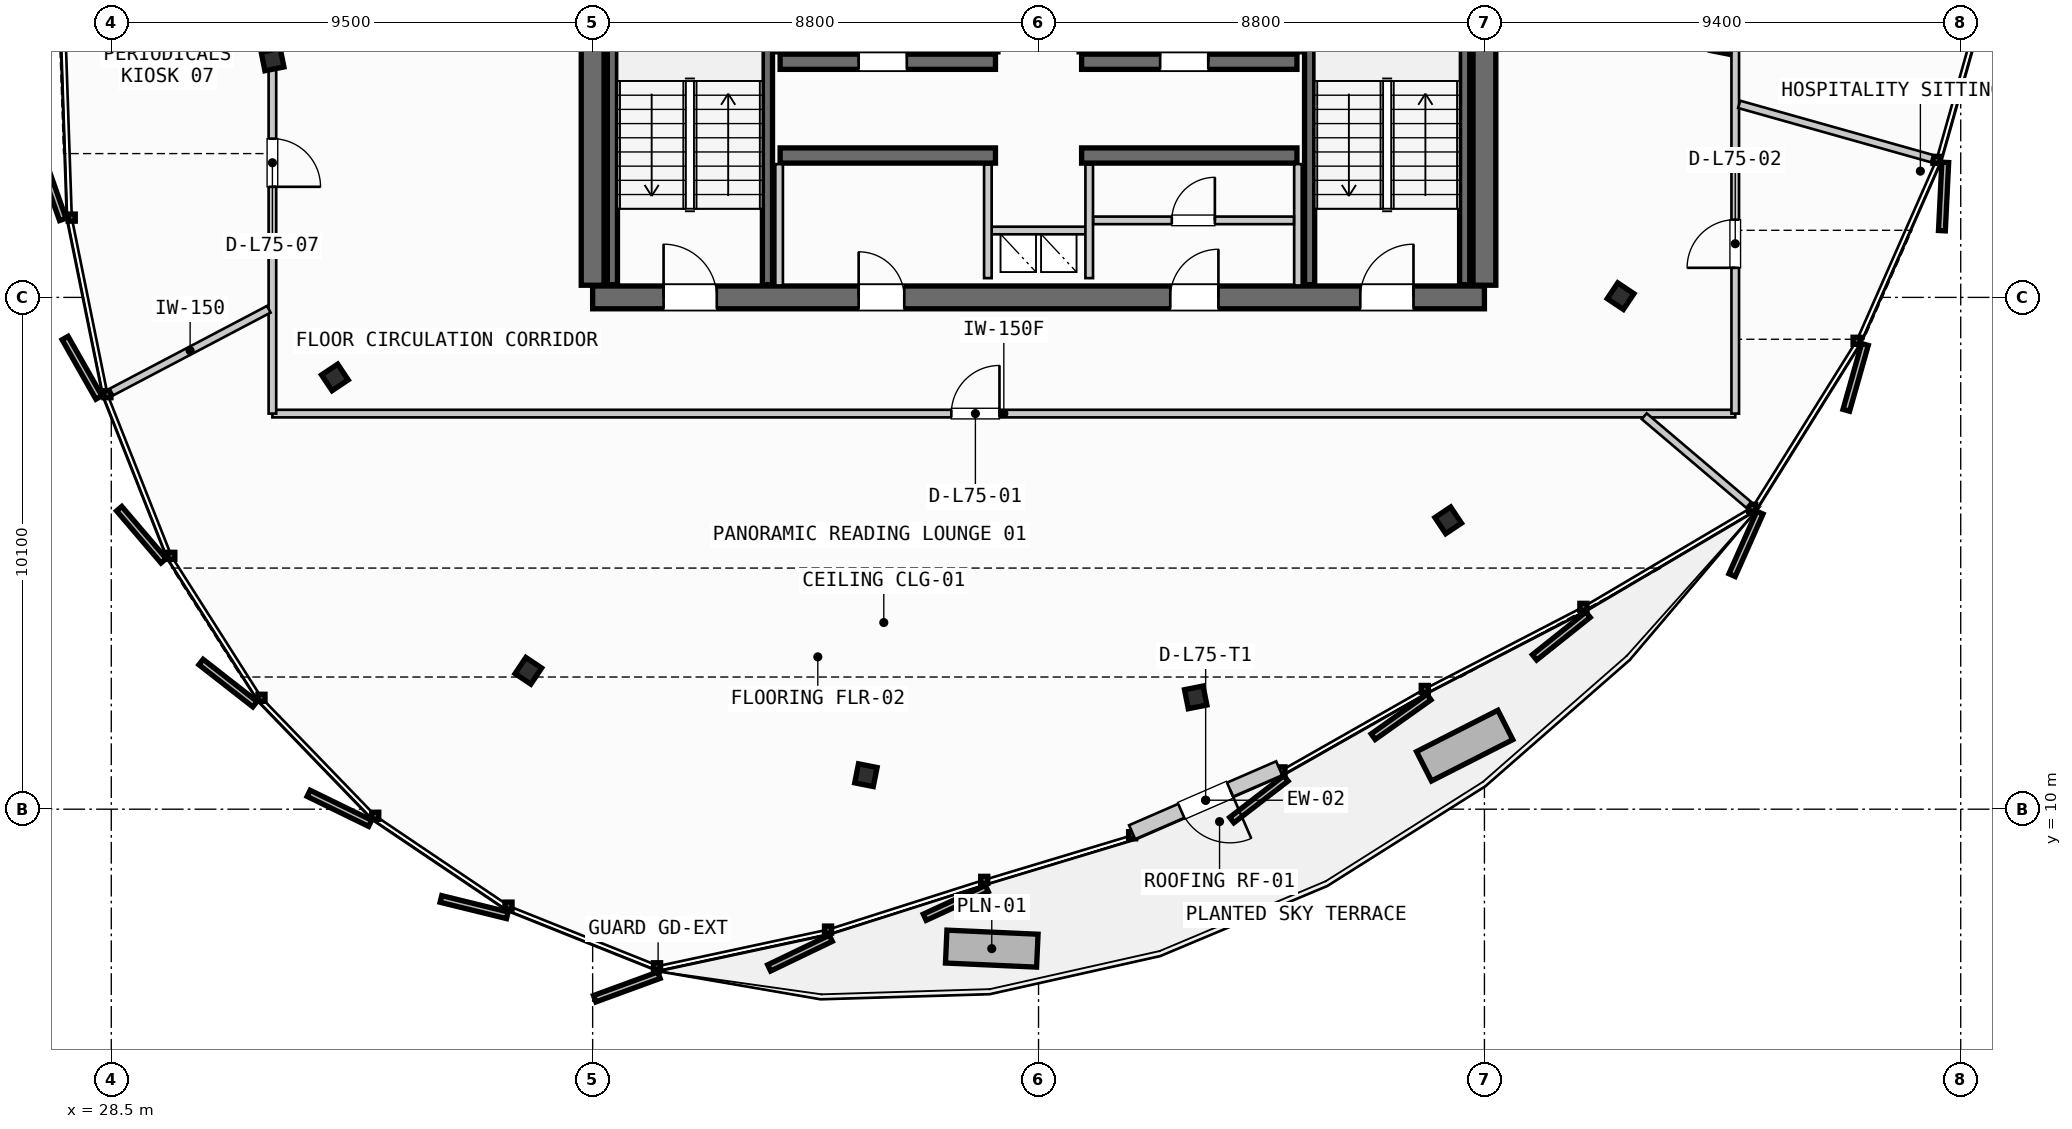
"""IFC4 building model, lengths in metres.
Left out: names, types, materials, properties, quantities, classifications, styles, units other than length and angle.
Written with IfcOpenShell. Run it as: python <this file> out.ifc"""

import sys

from ifc_helpers import new_model, si_unit, direction, frame, frame_2d, origin, origin_2d, place, context, subcontext, project, spatial, rectangle, i_section, extrude, source, transform, mapped, element, fill, save


model = new_model("IFC4")
c1 = context("Model", 3, precision=1e-05, world=origin(), true_north=direction((0.0, 1.0)))
c2 = subcontext(c1, "Body", "Model", "MODEL_VIEW")
j1 = project(units=[si_unit("LENGTHUNIT", "METRE"), si_unit("PLANEANGLEUNIT", "RADIAN")], contexts=[c1])
p1 = place(None, origin())
s1 = spatial("IfcSite", under=j1, at=p1, CompositionType="ELEMENT")
p2 = place(p1, origin())
s2 = spatial("IfcBuilding", under=s1, at=p2, CompositionType="ELEMENT")
p3 = place(p2, frame((0.0, 0.0, 283.6)))
s3 = spatial("IfcBuildingStorey", under=s2, at=p3, CompositionType="ELEMENT", Elevation=283.6)
p4 = place(p3, frame((38.0, 20.1, 0.0), z_axis=(0.0, 0.0, 1.0), x_axis=(1.0, 0.0, 0.0)))
e1 = element("IfcWall", 1, at=p4, inside=s3, PredefinedType="SHEAR", context=c2, shape_type="SweptSolid", body=[
    extrude(rectangle(XDim=17.6, YDim=0.45, at=frame_2d((8.8, 0.0))), origin(), (0.0, 0.0, 1.0), 3.21),
])
p5 = place(p4, frame((1.4, 0.0, 0.0)))
e2 = element("IfcOpeningElement", 2, at=p5, cuts=e1, PredefinedType="OPENING", context=c2, shape_type="SweptSolid", body=[
    extrude(rectangle(XDim=1.05, YDim=2.15, at=frame_2d((0.525, 1.075))), frame((0.0, 0.235, 0.0), z_axis=(0.0, -1.0, 0.0), x_axis=(1.0, 0.0, 0.0)), (0.0, 0.0, 1.0), 0.47),
])
p6 = place(p4, frame((15.15, 0.0, 0.0)))
e3 = element("IfcOpeningElement", 3, at=p6, cuts=e1, PredefinedType="OPENING", context=c2, shape_type="SweptSolid", body=[
    extrude(rectangle(XDim=1.05, YDim=2.15, at=frame_2d((0.525, 1.075))), frame((0.0, 0.235, 0.0), z_axis=(0.0, -1.0, 0.0), x_axis=(1.0, 0.0, 0.0)), (0.0, 0.0, 1.0), 0.47),
])
p7 = place(p4, frame((5.25, 0.0, 0.0)))
e4 = element("IfcOpeningElement", 4, at=p7, cuts=e1, PredefinedType="OPENING", context=c2, shape_type="SweptSolid", body=[
    extrude(rectangle(XDim=0.9, YDim=2.15, at=frame_2d((0.45, 1.075))), frame((0.0, 0.235, 0.0), z_axis=(0.0, -1.0, 0.0), x_axis=(1.0, 0.0, 0.0)), (0.0, 0.0, 1.0), 0.47),
])
p8 = place(p4, frame((11.4, 0.0, 0.0)))
e5 = element("IfcOpeningElement", 5, at=p8, cuts=e1, PredefinedType="OPENING", context=c2, shape_type="SweptSolid", body=[
    extrude(rectangle(XDim=0.95, YDim=2.15, at=frame_2d((0.475, 1.075))), frame((0.0, 0.235, 0.0), z_axis=(0.0, -1.0, 0.0), x_axis=(1.0, 0.0, 0.0)), (0.0, 0.0, 1.0), 0.47),
])
p9 = place(p3, frame((38.0, 35.26, 0.0), z_axis=(0.0, 0.0, 1.0), x_axis=(0.0, -1.0, 0.0)))
e6 = element("IfcWall", 6, at=p9, inside=s3, PredefinedType="SHEAR", context=c2, shape_type="SweptSolid", body=[
    extrude(rectangle(XDim=14.92, YDim=0.45, at=frame_2d((7.46, 0.0))), origin(), (0.0, 0.0, 1.0), 3.21),
])
p10 = place(p9, frame((5.21, 0.0, 0.0)))
e7 = element("IfcOpeningElement", 7, at=p10, cuts=e6, PredefinedType="OPENING", context=c2, shape_type="SweptSolid", body=[
    extrude(rectangle(XDim=1.1, YDim=2.2, at=frame_2d((0.55, 1.1))), frame((0.0, 0.235, 0.0), z_axis=(0.0, -1.0, 0.0), x_axis=(1.0, 0.0, 0.0)), (0.0, 0.0, 1.0), 0.47),
])
p11 = place(p3, frame((55.6, 20.34, 0.0), z_axis=(0.0, 0.0, 1.0), x_axis=(0.0, 1.0, 0.0)))
e8 = element("IfcWall", 8, at=p11, inside=s3, PredefinedType="SHEAR", context=c2, shape_type="SweptSolid", body=[
    extrude(rectangle(XDim=14.92, YDim=0.45, at=frame_2d((7.46, 0.0))), origin(), (0.0, 0.0, 1.0), 3.21),
])
p12 = place(p11, frame((12.71, 0.0, 0.0)))
e9 = element("IfcOpeningElement", 9, at=p12, cuts=e8, PredefinedType="OPENING", context=c2, shape_type="SweptSolid", body=[
    extrude(rectangle(XDim=1.05, YDim=2.15, at=frame_2d((0.525, 1.075))), frame((0.0, 0.235, 0.0), z_axis=(0.0, -1.0, 0.0), x_axis=(1.0, 0.0, 0.0)), (0.0, 0.0, 1.0), 0.47),
])
p13 = place(p11, frame((8.61, 0.0, 0.0)))
e10 = element("IfcOpeningElement", 10, at=p13, cuts=e8, PredefinedType="OPENING", context=c2, shape_type="SweptSolid", body=[
    extrude(rectangle(XDim=1.1, YDim=2.2, at=frame_2d((0.55, 1.1))), frame((0.0, 0.235, 0.0), z_axis=(0.0, -1.0, 0.0), x_axis=(1.0, 0.0, 0.0)), (0.0, 0.0, 1.0), 0.47),
])
for number, where, z_axis, x_axis in (
    (11, (41.7, 22.9, 0.0), (0.0, 0.0, 1.0), (1.0, 0.0, 0.0)),
    (12, (47.65, 22.9, 0.0), (0.0, 0.0, 1.0), (1.0, 0.0, 0.0)),
):
    element("IfcWall", number, at=place(p3, frame(where, z_axis=z_axis, x_axis=x_axis)), inside=s3, PredefinedType="SHEAR", context=c2, shape_type="SweptSolid", body=[
        extrude(rectangle(XDim=4.25, YDim=0.3, at=frame_2d((2.125, 0.0))), origin(), (0.0, 0.0, 1.0), 3.21),
    ])
p14 = place(p3, frame((41.7, 24.75, 0.0), z_axis=(0.0, 0.0, 1.0), x_axis=(1.0, 0.0, 0.0)))
e13 = element("IfcWall", 13, at=p14, inside=s3, PredefinedType="SHEAR", context=c2, shape_type="SweptSolid", body=[
    extrude(rectangle(XDim=4.25, YDim=0.3, at=frame_2d((2.125, 0.0))), origin(), (0.0, 0.0, 1.0), 3.21),
])
p15 = place(p14, frame((1.55, 0.0, 0.0)))
e14 = element("IfcOpeningElement", 14, at=p15, cuts=e13, PredefinedType="OPENING", context=c2, shape_type="SweptSolid", body=[
    extrude(rectangle(XDim=0.95, YDim=2.15, at=frame_2d((0.475, 1.075))), frame((0.0, 0.16, 0.0), z_axis=(0.0, -1.0, 0.0), x_axis=(1.0, 0.0, 0.0)), (0.0, 0.0, 1.0), 0.32),
])
p16 = place(p3, frame((47.65, 24.75, 0.0), z_axis=(0.0, 0.0, 1.0), x_axis=(1.0, 0.0, 0.0)))
e15 = element("IfcWall", 15, at=p16, inside=s3, PredefinedType="SHEAR", context=c2, shape_type="SweptSolid", body=[
    extrude(rectangle(XDim=4.25, YDim=0.3, at=frame_2d((2.125, 0.0))), origin(), (0.0, 0.0, 1.0), 3.21),
])
p17 = place(p16, frame((1.55, 0.0, 0.0)))
e16 = element("IfcOpeningElement", 16, at=p17, cuts=e15, PredefinedType="OPENING", context=c2, shape_type="SweptSolid", body=[
    extrude(rectangle(XDim=0.95, YDim=2.15, at=frame_2d((0.475, 1.075))), frame((0.0, 0.16, 0.0), z_axis=(0.0, -1.0, 0.0), x_axis=(1.0, 0.0, 0.0)), (0.0, 0.0, 1.0), 0.32),
])
m1 = source(origin(), c2, "Body", "SweptSolid", [
    extrude(i_section(OverallWidth=0.374, OverallDepth=0.383, WebThickness=0.017, FlangeThickness=0.026, FilletRadius=0.015, at=origin_2d()), origin(), (0.0, 0.0, 1.0), 3.21),
])
for number, where, z_axis, x_axis in (
    (17, (31.683, 24.793, 0.0), (0.0, 0.0, 1.0), (-0.981, -0.195, 0.0)),
    (18, (32.913, 18.521, 0.0), (0.0, 0.0, 1.0), (-0.831, -0.556, 0.0)),
    (19, (36.731, 12.731, 0.0), (0.0, 0.0, 1.0), (-0.556, -0.831, 0.0)),
    (20, (43.393, 10.671, 0.0), (0.0, 0.0, 1.0), (-0.195, -0.981, 0.0)),
    (21, (49.902, 12.207, 0.0), (0.0, 0.0, 1.0), (0.195, -0.981, 0.0)),
    (22, (54.885, 15.7, 0.0), (0.0, 0.0, 1.0), (0.556, -0.831, 0.0)),
    (23, (58.287, 20.125, 0.0), (0.0, 0.0, 1.0), (0.831, -0.556, 0.0)),
    (24, (60.284, 25.118, 0.0), (0.0, 0.0, 1.0), (0.981, -0.195, 0.0)),
):
    element("IfcColumn", number, at=place(p3, frame(where, z_axis=z_axis, x_axis=x_axis)), inside=s3, PredefinedType="COLUMN", context=c2, shape_type="MappedRepresentation", body=[
        mapped(m1, transform((0.0, 0.0, 0.0), scale=1.0)),
    ])
p18 = place(p3, frame((51.549, 10.808, 0.0), z_axis=(0.0, 0.0, 1.0), x_axis=(-0.917146084592, -0.398551200623, 0.0)))
e25 = element("IfcWall", 25, at=p18, inside=s3, PredefinedType="SOLIDWALL", context=c2, shape_type="SweptSolid", body=[
    extrude(rectangle(XDim=3.165, YDim=0.3, at=frame_2d((1.582, 0.0))), origin(), (0.0, 0.0, 1.0), 2.735),
])
p19 = place(p18, frame((1.057, 0.0, 0.0)))
e26 = element("IfcOpeningElement", 26, at=p19, cuts=e25, PredefinedType="OPENING", context=c2, shape_type="SweptSolid", body=[
    extrude(rectangle(XDim=1.05, YDim=2.2, at=frame_2d((0.525, 1.1))), frame((0.0, 0.16, 0.0), z_axis=(0.0, -1.0, 0.0), x_axis=(1.0, 0.0, 0.0)), (0.0, 0.0, 1.0), 0.32),
])
for number, where, z_axis, x_axis in (
    (27, (41.45, 27.7, 0.0), (0.0, 0.0, 1.0), (0.0, -1.0, 0.0)),
    (28, (38.39, 20.35, 0.0), (0.0, 0.0, 1.0), (0.0, 1.0, 0.0)),
    (29, (55.21, 27.7, 0.0), (0.0, 0.0, 1.0), (0.0, -1.0, 0.0)),
    (30, (52.15, 20.35, 0.0), (0.0, 0.0, 1.0), (0.0, 1.0, 0.0)),
):
    element("IfcWall", number, at=place(p3, frame(where, z_axis=z_axis, x_axis=x_axis)), inside=s3, PredefinedType="SHEAR", context=c2, shape_type="SweptSolid", body=[
        extrude(rectangle(XDim=7.35, YDim=0.2, at=frame_2d((3.675, 0.0))), origin(), (0.0, 0.0, 1.0), 3.21),
    ])
p20 = place(p3, frame((45.8, 21.42, 0.0), z_axis=(0.0, 0.0, 1.0), x_axis=(1.0, 0.0, 0.0)))
e31 = element("IfcWall", 31, at=p20, inside=s3, PredefinedType="PARTITIONING", context=c2, shape_type="SweptSolid", body=[
    extrude(rectangle(XDim=2.0, YDim=0.15, at=frame_2d((1.0, 0.0))), origin(), (0.0, 0.0, 1.0), 2.455),
])
for number, where, z_axis, x_axis in (
    (32, (45.8, 20.48, 0.0), (0.0, 0.0, 1.0), (0.0, 1.0, 0.0)),
    (33, (47.8, 20.48, 0.0), (0.0, 0.0, 1.0), (0.0, 1.0, 0.0)),
):
    element("IfcWall", number, at=place(p3, frame(where, z_axis=z_axis, x_axis=x_axis)), inside=s3, PredefinedType="PARTITIONING", context=c2, shape_type="SweptSolid", body=[
        extrude(rectangle(XDim=2.24, YDim=0.15, at=frame_2d((1.12, 0.0))), origin(), (0.0, 0.0, 1.0), 2.455),
    ])
for number, where, z_axis, x_axis in (
    (34, (41.68, 20.335, 0.0), (0.0, 0.0, 1.0), (0.0, 1.0, 0.0)),
    (35, (51.92, 20.335, 0.0), (0.0, 0.0, 1.0), (0.0, 1.0, 0.0)),
):
    element("IfcWall", number, at=place(p3, frame(where, z_axis=z_axis, x_axis=x_axis)), inside=s3, PredefinedType="PARTITIONING", context=c2, shape_type="SweptSolid", body=[
        extrude(rectangle(XDim=2.395, YDim=0.15, at=frame_2d((1.198, 0.0))), origin(), (0.0, 0.0, 1.0), 2.455),
    ])
p21 = place(p3, frame((47.88, 21.62, 0.0), z_axis=(0.0, 0.0, 1.0), x_axis=(1.0, 0.0, 0.0)))
e36 = element("IfcWall", 36, at=p21, inside=s3, PredefinedType="PARTITIONING", context=c2, shape_type="SweptSolid", body=[
    extrude(rectangle(XDim=3.96, YDim=0.15, at=frame_2d((1.98, 0.0))), origin(), (0.0, 0.0, 1.0), 2.455),
])
p22 = place(p21, frame((1.55, 0.0, 0.0)))
e37 = element("IfcOpeningElement", 37, at=p22, cuts=e36, PredefinedType="OPENING", context=c2, shape_type="SweptSolid", body=[
    extrude(rectangle(XDim=0.85, YDim=2.15, at=frame_2d((0.425, 1.075))), frame((0.0, 0.085, 0.0), z_axis=(0.0, -1.0, 0.0), x_axis=(1.0, 0.0, 0.0)), (0.0, 0.0, 1.0), 0.17),
])
for number, where, z_axis, x_axis in (
    (38, (41.7, 24.92, 0.0), (0.0, 0.0, 1.0), (0.0, 1.0, 0.0)),
    (39, (45.95, 24.92, 0.0), (0.0, 0.0, 1.0), (0.0, 1.0, 0.0)),
    (40, (47.65, 24.92, 0.0), (0.0, 0.0, 1.0), (0.0, 1.0, 0.0)),
    (41, (51.9, 24.92, 0.0), (0.0, 0.0, 1.0), (0.0, 1.0, 0.0)),
):
    element("IfcWall", number, at=place(p3, frame(where, z_axis=z_axis, x_axis=x_axis)), inside=s3, PredefinedType="PARTITIONING", context=c2, shape_type="SweptSolid", body=[
        extrude(rectangle(XDim=2.24, YDim=0.15, at=frame_2d((1.12, 0.0))), origin(), (0.0, 0.0, 1.0), 2.455),
    ])
p23 = place(p3, frame((31.68, 17.807, 0.0), z_axis=(0.0, 0.0, 1.0), x_axis=(1.0, 0.0, 0.0)))
e42 = element("IfcWall", 42, at=p23, inside=s3, PredefinedType="PARTITIONING", context=c2, shape_type="SweptSolid", body=[
    extrude(rectangle(XDim=28.87, YDim=0.15, at=frame_2d((14.435, 0.0))), origin(), (0.0, 0.0, 1.0), 2.455),
])
p24 = place(p23, frame((13.399, 0.0, 0.0)))
e43 = element("IfcOpeningElement", 43, at=p24, cuts=e42, PredefinedType="OPENING", context=c2, shape_type="SweptSolid", body=[
    extrude(rectangle(XDim=0.95, YDim=2.15, at=frame_2d((0.475, 1.075))), frame((0.0, 0.085, 0.0), z_axis=(0.0, -1.0, 0.0), x_axis=(1.0, 0.0, 0.0)), (0.0, 0.0, 1.0), 0.17),
])
p25 = place(p3, frame((60.55, 17.807, 0.0), z_axis=(0.0, 0.0, 1.0), x_axis=(0.0, 1.0, 0.0)))
e44 = element("IfcWall", 44, at=p25, inside=s3, PredefinedType="PARTITIONING", context=c2, shape_type="SweptSolid", body=[
    extrude(rectangle(XDim=19.986, YDim=0.15, at=frame_2d((9.993, 0.0))), origin(), (0.0, 0.0, 1.0), 2.455),
])
p26 = place(p25, frame((2.877, 0.0, 0.0)))
e45 = element("IfcOpeningElement", 45, at=p26, cuts=e44, PredefinedType="OPENING", context=c2, shape_type="SweptSolid", body=[
    extrude(rectangle(XDim=0.95, YDim=2.15, at=frame_2d((0.475, 1.075))), frame((0.0, 0.085, 0.0), z_axis=(0.0, -1.0, 0.0), x_axis=(1.0, 0.0, 0.0)), (0.0, 0.0, 1.0), 0.17),
])
p27 = place(p25, frame((10.685, 0.0, 0.0)))
e46 = element("IfcOpeningElement", 46, at=p27, cuts=e44, PredefinedType="OPENING", context=c2, shape_type="SweptSolid", body=[
    extrude(rectangle(XDim=0.95, YDim=2.15, at=frame_2d((0.475, 1.075))), frame((0.0, 0.085, 0.0), z_axis=(0.0, -1.0, 0.0), x_axis=(1.0, 0.0, 0.0)), (0.0, 0.0, 1.0), 0.17),
])
p28 = place(p3, frame((31.68, 37.793, 0.0), z_axis=(0.0, 0.0, 1.0), x_axis=(0.0, -1.0, 0.0)))
e47 = element("IfcWall", 47, at=p28, inside=s3, PredefinedType="PARTITIONING", context=c2, shape_type="SweptSolid", body=[
    extrude(rectangle(XDim=19.986, YDim=0.15, at=frame_2d((9.993, 0.0))), origin(), (0.0, 0.0, 1.0), 2.455),
])
p29 = place(p28, frame((4.973, 0.0, 0.0)))
e48 = element("IfcOpeningElement", 48, at=p29, cuts=e47, PredefinedType="OPENING", context=c2, shape_type="SweptSolid", body=[
    extrude(rectangle(XDim=0.95, YDim=2.15, at=frame_2d((0.475, 1.075))), frame((0.0, 0.085, 0.0), z_axis=(0.0, -1.0, 0.0), x_axis=(1.0, 0.0, 0.0)), (0.0, 0.0, 1.0), 0.17),
])
p30 = place(p28, frame((14.561, 0.0, 0.0)))
e49 = element("IfcOpeningElement", 49, at=p30, cuts=e47, PredefinedType="OPENING", context=c2, shape_type="SweptSolid", body=[
    extrude(rectangle(XDim=0.95, YDim=2.15, at=frame_2d((0.475, 1.075))), frame((0.0, 0.085, 0.0), z_axis=(0.0, -1.0, 0.0), x_axis=(1.0, 0.0, 0.0)), (0.0, 0.0, 1.0), 0.17),
])
p31 = place(p3, frame((31.609, 19.866, 0.0), z_axis=(0.0, 0.0, 1.0), x_axis=(-0.885085653162, -0.465428175519, 0.0)))
e50 = element("IfcWall", 50, at=p31, inside=s3, PredefinedType="PARTITIONING", context=c2, shape_type="SweptSolid", body=[
    extrude(rectangle(XDim=3.51, YDim=0.15, at=frame_2d((1.755, 0.0))), origin(), (0.0, 0.0, 1.0), 2.455),
])
p32 = place(p3, frame((58.754, 17.755, 0.0), z_axis=(0.0, 0.0, 1.0), x_axis=(0.762491586171, -0.646998130615, 0.0)))
e51 = element("IfcWall", 51, at=p32, inside=s3, PredefinedType="PARTITIONING", context=c2, shape_type="SweptSolid", body=[
    extrude(rectangle(XDim=2.704, YDim=0.15, at=frame_2d((1.352, 0.0))), origin(), (0.0, 0.0, 1.0), 2.455),
])
p33 = place(p3, frame((60.627, 23.909, 0.0), z_axis=(0.0, 0.0, 1.0), x_axis=(0.962613229875, -0.270879622102, 0.0)))
e52 = element("IfcWall", 52, at=p33, inside=s3, PredefinedType="PARTITIONING", context=c2, shape_type="SweptSolid", body=[
    extrude(rectangle(XDim=3.956, YDim=0.15, at=frame_2d((1.978, 0.0))), origin(), (0.0, 0.0, 1.0), 2.455),
])
m2 = source(origin(), c2, "Body", "SweptSolid", [
    extrude(rectangle(XDim=1.05, YDim=2.2, at=frame_2d((0.525, 1.1))), frame((0.0, 0.025, 0.0), z_axis=(0.0, -1.0, 0.0), x_axis=(1.0, 0.0, 0.0)), (0.0, 0.0, 1.0), 0.05),
])
p34 = place(p19, origin())
e53 = element("IfcDoor", 53, at=p34, inside=s3, OperationType="SINGLE_SWING_LEFT", PredefinedType="DOOR", context=c2, shape_type="MappedRepresentation", body=[
    mapped(m2, transform((0.0, 0.0, 0.0), scale=1.0)),
])
fill(e26, e53)
m3 = source(origin(), c2, "Body", "SweptSolid", [
    extrude(rectangle(XDim=1.05, YDim=2.15, at=frame_2d((0.525, 1.075))), frame((0.0, 0.025, 0.0), z_axis=(0.0, -1.0, 0.0), x_axis=(1.0, 0.0, 0.0)), (0.0, 0.0, 1.0), 0.05),
])
p35 = place(p5, origin())
e54 = element("IfcDoor", 54, at=p35, inside=s3, OperationType="SINGLE_SWING_LEFT", PredefinedType="DOOR", context=c2, shape_type="MappedRepresentation", body=[
    mapped(m3, transform((0.0, 0.0, 0.0), scale=1.0)),
])
fill(e2, e54)
p36 = place(p6, origin())
e55 = element("IfcDoor", 55, at=p36, inside=s3, OperationType="SINGLE_SWING_RIGHT", PredefinedType="DOOR", context=c2, shape_type="MappedRepresentation", body=[
    mapped(m3, transform((0.0, 0.0, 0.0), scale=1.0)),
])
fill(e3, e55)
m4 = source(origin(), c2, "Body", "SweptSolid", [
    extrude(rectangle(XDim=0.9, YDim=2.15, at=frame_2d((0.45, 1.075))), frame((0.0, 0.025, 0.0), z_axis=(0.0, -1.0, 0.0), x_axis=(1.0, 0.0, 0.0)), (0.0, 0.0, 1.0), 0.05),
])
p37 = place(p7, origin())
e56 = element("IfcDoor", 56, at=p37, inside=s3, OperationType="SINGLE_SWING_LEFT", PredefinedType="DOOR", context=c2, shape_type="MappedRepresentation", body=[
    mapped(m4, transform((0.0, 0.0, 0.0), scale=1.0)),
])
fill(e4, e56)
m5 = source(origin(), c2, "Body", "SweptSolid", [
    extrude(rectangle(XDim=0.95, YDim=2.15, at=frame_2d((0.475, 1.075))), frame((0.0, 0.025, 0.0), z_axis=(0.0, -1.0, 0.0), x_axis=(1.0, 0.0, 0.0)), (0.0, 0.0, 1.0), 0.05),
])
p38 = place(p8, origin())
e57 = element("IfcDoor", 57, at=p38, inside=s3, OperationType="SINGLE_SWING_RIGHT", PredefinedType="DOOR", context=c2, shape_type="MappedRepresentation", body=[
    mapped(m5, transform((0.0, 0.0, 0.0), scale=1.0)),
])
fill(e5, e57)
p39 = place(p15, origin())
e58 = element("IfcDoor", 58, at=p39, inside=s3, OperationType="SINGLE_SWING_LEFT", PredefinedType="DOOR", context=c2, shape_type="MappedRepresentation", body=[
    mapped(m5, transform((0.0, 0.0, 0.0), scale=1.0)),
])
fill(e14, e58)
p40 = place(p17, origin())
e59 = element("IfcDoor", 59, at=p40, inside=s3, OperationType="SINGLE_SWING_RIGHT", PredefinedType="DOOR", context=c2, shape_type="MappedRepresentation", body=[
    mapped(m5, transform((0.0, 0.0, 0.0), scale=1.0)),
])
fill(e16, e59)
m6 = source(origin(), c2, "Body", "SweptSolid", [
    extrude(rectangle(XDim=0.85, YDim=2.15, at=frame_2d((0.425, 1.075))), frame((0.0, 0.025, 0.0), z_axis=(0.0, -1.0, 0.0), x_axis=(1.0, 0.0, 0.0)), (0.0, 0.0, 1.0), 0.05),
])
p41 = place(p22, origin())
e60 = element("IfcDoor", 60, at=p41, inside=s3, OperationType="SINGLE_SWING_RIGHT", PredefinedType="DOOR", context=c2, shape_type="MappedRepresentation", body=[
    mapped(m6, transform((0.0, 0.0, 0.0), scale=1.0)),
])
fill(e37, e60)
p42 = place(p24, origin())
e61 = element("IfcDoor", 61, at=p42, inside=s3, OperationType="SINGLE_SWING_RIGHT", PredefinedType="DOOR", context=c2, shape_type="MappedRepresentation", body=[
    mapped(m5, transform((0.0, 0.0, 0.0), scale=1.0)),
])
fill(e43, e61)
p43 = place(p26, origin())
e62 = element("IfcDoor", 62, at=p43, inside=s3, OperationType="SINGLE_SWING_LEFT", PredefinedType="DOOR", context=c2, shape_type="MappedRepresentation", body=[
    mapped(m5, transform((0.0, 0.0, 0.0), scale=1.0)),
])
fill(e45, e62)
p44 = place(p30, origin())
e63 = element("IfcDoor", 63, at=p44, inside=s3, OperationType="SINGLE_SWING_RIGHT", PredefinedType="DOOR", context=c2, shape_type="MappedRepresentation", body=[
    mapped(m5, transform((0.0, 0.0, 0.0), scale=1.0)),
])
fill(e49, e63)
save(model, sys.argv[1])
